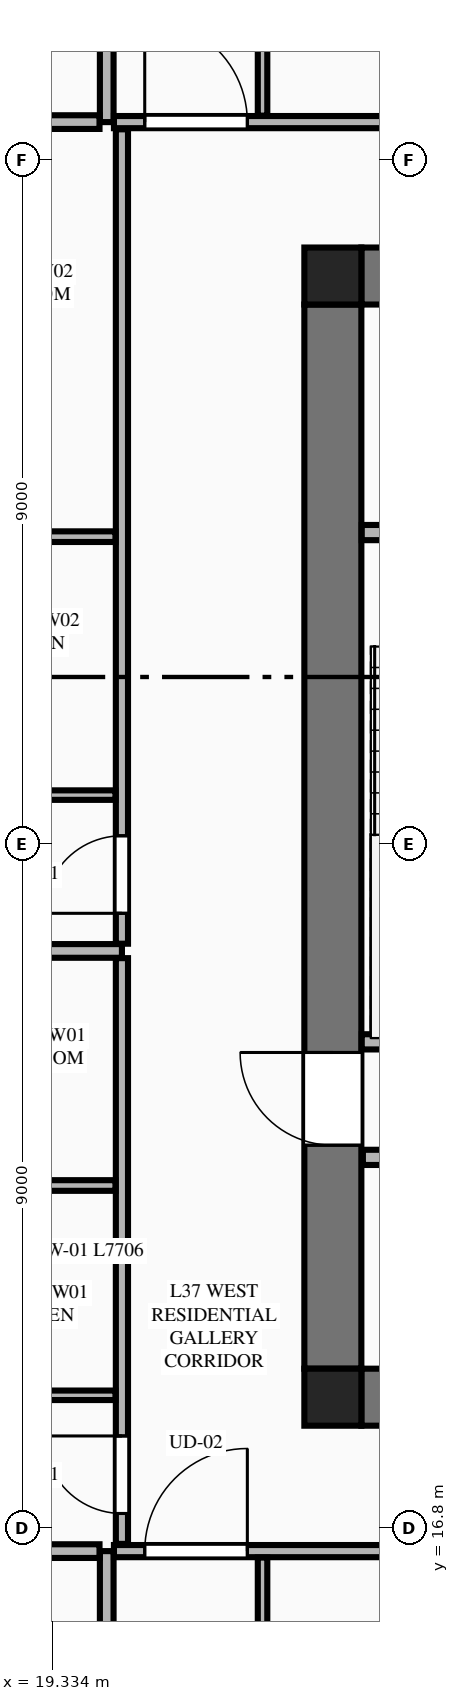
"""IFC4 building model, lengths in metres.
Left out: names, types, materials, properties, quantities, classifications, styles, units other than length and angle.
Written with IfcOpenShell. Run it as: python <this file> out.ifc"""

import sys

from ifc_helpers import new_model, si_unit, direction, frame, frame_2d, origin, origin_2d, place, context, subcontext, project, spatial, rectangle, extrude, element, fill, save


model = new_model("IFC4")
c1 = context("Model", 3, precision=1e-05, world=origin(), true_north=direction((0.0, 1.0)))
c2 = subcontext(c1, "Body", "Model", "MODEL_VIEW")
j1 = project(units=[si_unit("LENGTHUNIT", "METRE"), si_unit("PLANEANGLEUNIT", "RADIAN")], contexts=[c1])
p1 = place(None, origin())
s1 = spatial("IfcSite", under=j1, at=p1, CompositionType="ELEMENT")
p2 = place(p1, origin())
s2 = spatial("IfcBuilding", under=s1, at=p2, CompositionType="ELEMENT")
p3 = place(p2, frame((0.0, 0.0, 141.0)))
s3 = spatial("IfcBuildingStorey", under=s2, at=p3, CompositionType="ELEMENT", Elevation=141.0)
for number, where, z_axis, x_axis in (
    (1, (23.025, 18.525, 0.0), (0.0, 0.0, 1.0), (1.0, 0.0, 0.0)),
    (2, (23.025, 33.275, 0.0), (0.0, 0.0, 1.0), (1.0, 0.0, 0.0)),
):
    element("IfcColumn", number, at=place(p3, frame(where, z_axis=z_axis, x_axis=x_axis)), inside=s3, PredefinedType="COLUMN", context=c2, shape_type="SweptSolid", body=[
        extrude(rectangle(XDim=0.75, YDim=0.75, at=origin_2d()), origin(), (0.0, 0.0, 1.0), 3.55),
    ])
for number, where, z_axis, x_axis in (
    (3, (23.4, 18.525, 0.0), (0.0, 0.0, 1.0), (1.0, 0.0, 0.0)),
    (4, (23.4, 33.275, 0.0), (0.0, 0.0, 1.0), (1.0, 0.0, 0.0)),
):
    element("IfcWall", number, at=place(p3, frame(where, z_axis=z_axis, x_axis=x_axis)), inside=s3, PredefinedType="SHEAR", context=c2, shape_type="SweptSolid", body=[
        extrude(rectangle(XDim=18.0, YDim=0.75, at=frame_2d((9.0, 0.0))), origin(), (0.0, 0.0, 1.0), 3.34),
    ])
p4 = place(p3, frame((23.025, 18.9, 0.0), z_axis=(0.0, 0.0, 1.0), x_axis=(0.0, 1.0, 0.0)))
e5 = element("IfcWall", 5, at=p4, inside=s3, PredefinedType="SHEAR", context=c2, shape_type="SweptSolid", body=[
    extrude(rectangle(XDim=14.0, YDim=0.75, at=frame_2d((7.0, 0.0))), origin(), (0.0, 0.0, 1.0), 3.34),
])
p5 = place(p4, frame((2.94, 0.0, 0.0)))
e6 = element("IfcOpeningElement", 6, at=p5, cuts=e5, PredefinedType="OPENING", context=c2, shape_type="SweptSolid", body=[
    extrude(rectangle(XDim=1.22, YDim=2.25, at=frame_2d((0.61, 1.125))), frame((0.0, 0.385, 0.0), z_axis=(0.0, -1.0, 0.0), x_axis=(1.0, 0.0, 0.0)), (0.0, 0.0, 1.0), 0.77),
])
p6 = place(p3, frame((23.405, 23.2, 0.0), z_axis=(0.0, 0.0, 1.0), x_axis=(1.0, 0.0, 0.0)))
e7 = element("IfcWall", 7, at=p6, inside=s3, PredefinedType="PLUMBINGWALL", context=c2, shape_type="SweptSolid", body=[
    extrude(rectangle(XDim=3.27, YDim=0.2, at=frame_2d((1.635, 0.0))), origin(), (0.0, 0.0, 1.0), 3.34),
])
p7 = place(p3, frame((23.405, 29.9, 0.0), z_axis=(0.0, 0.0, 1.0), x_axis=(1.0, 0.0, 0.0)))
e8 = element("IfcWall", 8, at=p7, inside=s3, PredefinedType="PLUMBINGWALL", context=c2, shape_type="SweptSolid", body=[
    extrude(rectangle(XDim=3.27, YDim=0.2, at=frame_2d((1.635, 0.0))), origin(), (0.0, 0.0, 1.0), 3.34),
])
p8 = place(p7, frame((1.85, 0.0, 0.0)))
e9 = element("IfcOpeningElement", 9, at=p8, cuts=e8, PredefinedType="OPENING", context=c2, shape_type="SweptSolid", body=[
    extrude(rectangle(XDim=0.85, YDim=2.05, at=frame_2d((0.425, 1.025))), frame((0.0, 0.11, 0.0), z_axis=(0.0, -1.0, 0.0), x_axis=(1.0, 0.0, 0.0)), (0.0, 0.0, 1.0), 0.22),
])
p9 = place(p3, frame((23.42, 21.68, 0.0), z_axis=(0.0, 0.0, 1.0), x_axis=(1.0, 0.0, 0.0)))
e10 = element("IfcWall", 10, at=p9, inside=s3, PredefinedType="PLUMBINGWALL", context=c2, shape_type="SweptSolid", body=[
    extrude(rectangle(XDim=17.96, YDim=0.2, at=frame_2d((8.98, 0.0))), origin(), (0.0, 0.0, 1.0), 3.34),
])
p10 = place(p9, frame((11.6, 0.0, 0.0)))
e11 = element("IfcOpeningElement", 11, at=p10, cuts=e10, PredefinedType="OPENING", context=c2, shape_type="SweptSolid", body=[
    extrude(rectangle(XDim=1.1, YDim=2.2, at=frame_2d((0.55, 1.1))), frame((0.0, 0.11, 0.0), z_axis=(0.0, -1.0, 0.0), x_axis=(1.0, 0.0, 0.0)), (0.0, 0.0, 1.0), 0.22),
])
p11 = place(p9, frame((0.41, 0.0, 0.0)))
e12 = element("IfcOpeningElement", 12, at=p11, cuts=e10, PredefinedType="OPENING", context=c2, shape_type="SweptSolid", body=[
    extrude(rectangle(XDim=0.85, YDim=2.05, at=frame_2d((0.425, 1.025))), frame((0.0, 0.11, 0.0), z_axis=(0.0, -1.0, 0.0), x_axis=(1.0, 0.0, 0.0)), (0.0, 0.0, 1.0), 0.22),
])
p12 = place(p9, frame((4.13, 0.0, 0.0)))
e13 = element("IfcOpeningElement", 13, at=p12, cuts=e10, PredefinedType="OPENING", context=c2, shape_type="SweptSolid", body=[
    extrude(rectangle(XDim=0.85, YDim=2.05, at=frame_2d((0.425, 1.025))), frame((0.0, 0.11, 0.0), z_axis=(0.0, -1.0, 0.0), x_axis=(1.0, 0.0, 0.0)), (0.0, 0.0, 1.0), 0.22),
])
p13 = place(p9, frame((7.83, 0.0, 0.0)))
e14 = element("IfcOpeningElement", 14, at=p13, cuts=e10, PredefinedType="OPENING", context=c2, shape_type="SweptSolid", body=[
    extrude(rectangle(XDim=0.85, YDim=2.05, at=frame_2d((0.425, 1.025))), frame((0.0, 0.11, 0.0), z_axis=(0.0, -1.0, 0.0), x_axis=(1.0, 0.0, 0.0)), (0.0, 0.0, 1.0), 0.22),
])
p14 = place(p9, frame((13.78, 0.0, 0.0)))
e15 = element("IfcOpeningElement", 15, at=p14, cuts=e10, PredefinedType="OPENING", context=c2, shape_type="SweptSolid", body=[
    extrude(rectangle(XDim=0.85, YDim=2.05, at=frame_2d((0.425, 1.025))), frame((0.0, 0.11, 0.0), z_axis=(0.0, -1.0, 0.0), x_axis=(1.0, 0.0, 0.0)), (0.0, 0.0, 1.0), 0.22),
])
p15 = place(p9, frame((16.13, 0.0, 0.0)))
e16 = element("IfcOpeningElement", 16, at=p15, cuts=e10, PredefinedType="OPENING", context=c2, shape_type="SweptSolid", body=[
    extrude(rectangle(XDim=0.85, YDim=2.05, at=frame_2d((0.425, 1.025))), frame((0.0, 0.11, 0.0), z_axis=(0.0, -1.0, 0.0), x_axis=(1.0, 0.0, 0.0)), (0.0, 0.0, 1.0), 0.22),
])
p16 = place(p3, frame((20.05, 4.105, 0.0), z_axis=(0.0, 0.0, 1.0), x_axis=(0.0, 1.0, 0.0)))
e17 = element("IfcWall", 17, at=p16, inside=s3, PredefinedType="PARTITIONING", context=c2, shape_type="SweptSolid", body=[
    extrude(rectangle(XDim=12.395, YDim=0.18, at=frame_2d((6.198, 0.0))), origin(), (0.0, 0.0, 1.0), 3.34),
])
p17 = place(p3, frame((20.145, 16.5, 0.0), z_axis=(0.0, 0.0, 1.0), x_axis=(1.0, 0.0, 0.0)))
e18 = element("IfcWall", 18, at=p17, inside=s3, PredefinedType="PARTITIONING", context=c2, shape_type="SweptSolid", body=[
    extrude(rectangle(XDim=24.51, YDim=0.16, at=frame_2d((12.255, 0.0))), origin(), (0.0, 0.0, 1.0), 3.34),
])
p18 = place(p17, frame((0.405, 0.0, 0.0)))
e19 = element("IfcOpeningElement", 19, at=p18, cuts=e18, PredefinedType="OPENING", context=c2, shape_type="SweptSolid", body=[
    extrude(rectangle(XDim=1.35, YDim=2.35, at=frame_2d((0.675, 1.175))), frame((0.0, 0.09, 0.0), z_axis=(0.0, -1.0, 0.0), x_axis=(1.0, 0.0, 0.0)), (0.0, 0.0, 1.0), 0.18),
])
p19 = place(p3, frame((22.1, 12.267, 0.0), z_axis=(0.0, 0.0, 1.0), x_axis=(0.0, 1.0, 0.0)))
e20 = element("IfcWall", 20, at=p19, inside=s3, PredefinedType="PARTITIONING", context=c2, shape_type="SweptSolid", body=[
    extrude(rectangle(XDim=4.148, YDim=0.125, at=frame_2d((2.074, 0.0))), origin(), (0.0, 0.0, 1.0), 2.722),
])
p20 = place(p3, frame((20.05, 35.3, 0.0), z_axis=(0.0, 0.0, 1.0), x_axis=(0.0, 1.0, 0.0)))
e21 = element("IfcWall", 21, at=p20, inside=s3, PredefinedType="PARTITIONING", context=c2, shape_type="SweptSolid", body=[
    extrude(rectangle(XDim=12.195, YDim=0.18, at=frame_2d((6.098, 0.0))), origin(), (0.0, 0.0, 1.0), 3.34),
])
p21 = place(p3, frame((20.145, 35.3, 0.0), z_axis=(0.0, 0.0, 1.0), x_axis=(1.0, 0.0, 0.0)))
e22 = element("IfcWall", 22, at=p21, inside=s3, PredefinedType="PARTITIONING", context=c2, shape_type="SweptSolid", body=[
    extrude(rectangle(XDim=24.51, YDim=0.16, at=frame_2d((12.255, 0.0))), origin(), (0.0, 0.0, 1.0), 3.34),
])
p22 = place(p21, frame((0.405, 0.0, 0.0)))
e23 = element("IfcOpeningElement", 23, at=p22, cuts=e22, PredefinedType="OPENING", context=c2, shape_type="SweptSolid", body=[
    extrude(rectangle(XDim=1.35, YDim=2.35, at=frame_2d((0.675, 1.175))), frame((0.0, 0.09, 0.0), z_axis=(0.0, -1.0, 0.0), x_axis=(1.0, 0.0, 0.0)), (0.0, 0.0, 1.0), 0.18),
])
p23 = place(p3, frame((22.1, 35.385, 0.0), z_axis=(0.0, 0.0, 1.0), x_axis=(0.0, 1.0, 0.0)))
e24 = element("IfcWall", 24, at=p23, inside=s3, PredefinedType="PARTITIONING", context=c2, shape_type="SweptSolid", body=[
    extrude(rectangle(XDim=6.151, YDim=0.125, at=frame_2d((3.075, 0.0))), origin(), (0.0, 0.0, 1.0), 2.722),
])
p24 = place(p3, frame((12.185, 16.5, 0.0), z_axis=(0.0, 0.0, 1.0), x_axis=(1.0, 0.0, 0.0)))
e25 = element("IfcWall", 25, at=p24, inside=s3, PredefinedType="PARTITIONING", context=c2, shape_type="SweptSolid", body=[
    extrude(rectangle(XDim=7.77, YDim=0.18, at=frame_2d((3.885, 0.0))), origin(), (0.0, 0.0, 1.0), 3.34),
])
p25 = place(p3, frame((12.286, 35.3, 0.0), z_axis=(0.0, 0.0, 1.0), x_axis=(1.0, 0.0, 0.0)))
e26 = element("IfcWall", 26, at=p25, inside=s3, PredefinedType="PARTITIONING", context=c2, shape_type="SweptSolid", body=[
    extrude(rectangle(XDim=7.669, YDim=0.18, at=frame_2d((3.834, 0.0))), origin(), (0.0, 0.0, 1.0), 3.34),
])
p26 = place(p3, frame((20.25, 16.595, 0.0), z_axis=(0.0, 0.0, 1.0), x_axis=(0.0, 1.0, 0.0)))
e27 = element("IfcWall", 27, at=p26, inside=s3, PredefinedType="PARTITIONING", context=c2, shape_type="SweptSolid", body=[
    extrude(rectangle(XDim=7.706, YDim=0.16, at=frame_2d((3.853, 0.0))), origin(), (0.0, 0.0, 1.0), 3.34),
])
p27 = place(p26, frame((0.4, 0.0, 0.0)))
e28 = element("IfcOpeningElement", 28, at=p27, cuts=e27, PredefinedType="OPENING", context=c2, shape_type="SweptSolid", body=[
    extrude(rectangle(XDim=1.02, YDim=2.25, at=frame_2d((0.51, 1.125))), frame((0.0, 0.09, 0.0), z_axis=(0.0, -1.0, 0.0), x_axis=(1.0, 0.0, 0.0)), (0.0, 0.0, 1.0), 0.18),
])
p28 = place(p3, frame((17.585, 18.55, 0.0), z_axis=(0.0, 0.0, 1.0), x_axis=(1.0, 0.0, 0.0)))
e29 = element("IfcWall", 29, at=p28, inside=s3, PredefinedType="PARTITIONING", context=c2, shape_type="SweptSolid", body=[
    extrude(rectangle(XDim=2.58, YDim=0.125, at=frame_2d((1.29, 0.0))), origin(), (0.0, 0.0, 1.0), 2.722),
])
p29 = place(p3, frame((17.585, 21.31, 0.0), z_axis=(0.0, 0.0, 1.0), x_axis=(1.0, 0.0, 0.0)))
e30 = element("IfcWall", 30, at=p29, inside=s3, PredefinedType="PLUMBINGWALL", context=c2, shape_type="SweptSolid", body=[
    extrude(rectangle(XDim=2.58, YDim=0.14, at=frame_2d((1.29, 0.0))), origin(), (0.0, 0.0, 1.0), 3.34),
])
p30 = place(p3, frame((8.19, 24.396, 0.0), z_axis=(0.0, 0.0, 1.0), x_axis=(1.0, 0.0, 0.0)))
e31 = element("IfcWall", 31, at=p30, inside=s3, PredefinedType="PARTITIONING", context=c2, shape_type="SweptSolid", body=[
    extrude(rectangle(XDim=12.06, YDim=0.18, at=frame_2d((6.03, 0.0))), origin(), (0.0, 0.0, 1.0), 3.34),
])
p31 = place(p3, frame((20.25, 24.491, 0.0), z_axis=(0.0, 0.0, 1.0), x_axis=(0.0, 1.0, 0.0)))
e32 = element("IfcWall", 32, at=p31, inside=s3, PredefinedType="PARTITIONING", context=c2, shape_type="SweptSolid", body=[
    extrude(rectangle(XDim=10.714, YDim=0.16, at=frame_2d((5.357, 0.0))), origin(), (0.0, 0.0, 1.0), 3.34),
])
p32 = place(p31, frame((0.4, 0.0, 0.0)))
e33 = element("IfcOpeningElement", 33, at=p32, cuts=e32, PredefinedType="OPENING", context=c2, shape_type="SweptSolid", body=[
    extrude(rectangle(XDim=1.02, YDim=2.25, at=frame_2d((0.51, 1.125))), frame((0.0, 0.09, 0.0), z_axis=(0.0, -1.0, 0.0), x_axis=(1.0, 0.0, 0.0)), (0.0, 0.0, 1.0), 0.18),
])
p33 = place(p3, frame((17.585, 26.446, 0.0), z_axis=(0.0, 0.0, 1.0), x_axis=(1.0, 0.0, 0.0)))
e34 = element("IfcWall", 34, at=p33, inside=s3, PredefinedType="PARTITIONING", context=c2, shape_type="SweptSolid", body=[
    extrude(rectangle(XDim=2.58, YDim=0.125, at=frame_2d((1.29, 0.0))), origin(), (0.0, 0.0, 1.0), 3.34),
])
p34 = place(p3, frame((17.585, 29.846, 0.0), z_axis=(0.0, 0.0, 1.0), x_axis=(1.0, 0.0, 0.0)))
e35 = element("IfcWall", 35, at=p34, inside=s3, PredefinedType="PLUMBINGWALL", context=c2, shape_type="SweptSolid", body=[
    extrude(rectangle(XDim=2.58, YDim=0.14, at=frame_2d((1.29, 0.0))), origin(), (0.0, 0.0, 1.0), 3.34),
])
p35 = place(p5, origin())
e36 = element("IfcDoor", 36, at=p35, inside=s3, OperationType="SINGLE_SWING_RIGHT", PredefinedType="DOOR", context=c2, shape_type="SweptSolid", body=[
    extrude(rectangle(XDim=1.22, YDim=2.25, at=frame_2d((0.61, 1.125))), frame((0.0, 0.025, 0.0), z_axis=(0.0, -1.0, 0.0), x_axis=(1.0, 0.0, 0.0)), (0.0, 0.0, 1.0), 0.05),
])
fill(e6, e36)
p36 = place(p18, origin())
e37 = element("IfcDoor", 37, at=p36, inside=s3, OperationType="SINGLE_SWING_RIGHT", PredefinedType="DOOR", context=c2, shape_type="SweptSolid", body=[
    extrude(rectangle(XDim=1.35, YDim=2.35, at=frame_2d((0.675, 1.175))), frame((0.0, 0.025, 0.0), z_axis=(0.0, -1.0, 0.0), x_axis=(1.0, 0.0, 0.0)), (0.0, 0.0, 1.0), 0.05),
])
fill(e19, e37)
p37 = place(p22, origin())
e38 = element("IfcDoor", 38, at=p37, inside=s3, OperationType="SINGLE_SWING_LEFT", PredefinedType="DOOR", context=c2, shape_type="SweptSolid", body=[
    extrude(rectangle(XDim=1.35, YDim=2.35, at=frame_2d((0.675, 1.175))), frame((0.0, 0.025, 0.0), z_axis=(0.0, -1.0, 0.0), x_axis=(1.0, 0.0, 0.0)), (0.0, 0.0, 1.0), 0.05),
])
fill(e23, e38)
p38 = place(p27, origin())
e39 = element("IfcDoor", 39, at=p38, inside=s3, OperationType="SINGLE_SWING_RIGHT", PredefinedType="DOOR", context=c2, shape_type="SweptSolid", body=[
    extrude(rectangle(XDim=1.02, YDim=2.25, at=frame_2d((0.51, 1.125))), frame((0.0, 0.025, 0.0), z_axis=(0.0, -1.0, 0.0), x_axis=(1.0, 0.0, 0.0)), (0.0, 0.0, 1.0), 0.05),
])
fill(e28, e39)
p39 = place(p32, origin())
e40 = element("IfcDoor", 40, at=p39, inside=s3, OperationType="SINGLE_SWING_LEFT", PredefinedType="DOOR", context=c2, shape_type="SweptSolid", body=[
    extrude(rectangle(XDim=1.02, YDim=2.25, at=frame_2d((0.51, 1.125))), frame((0.0, 0.025, 0.0), z_axis=(0.0, -1.0, 0.0), x_axis=(1.0, 0.0, 0.0)), (0.0, 0.0, 1.0), 0.05),
])
fill(e33, e40)
save(model, sys.argv[1])
